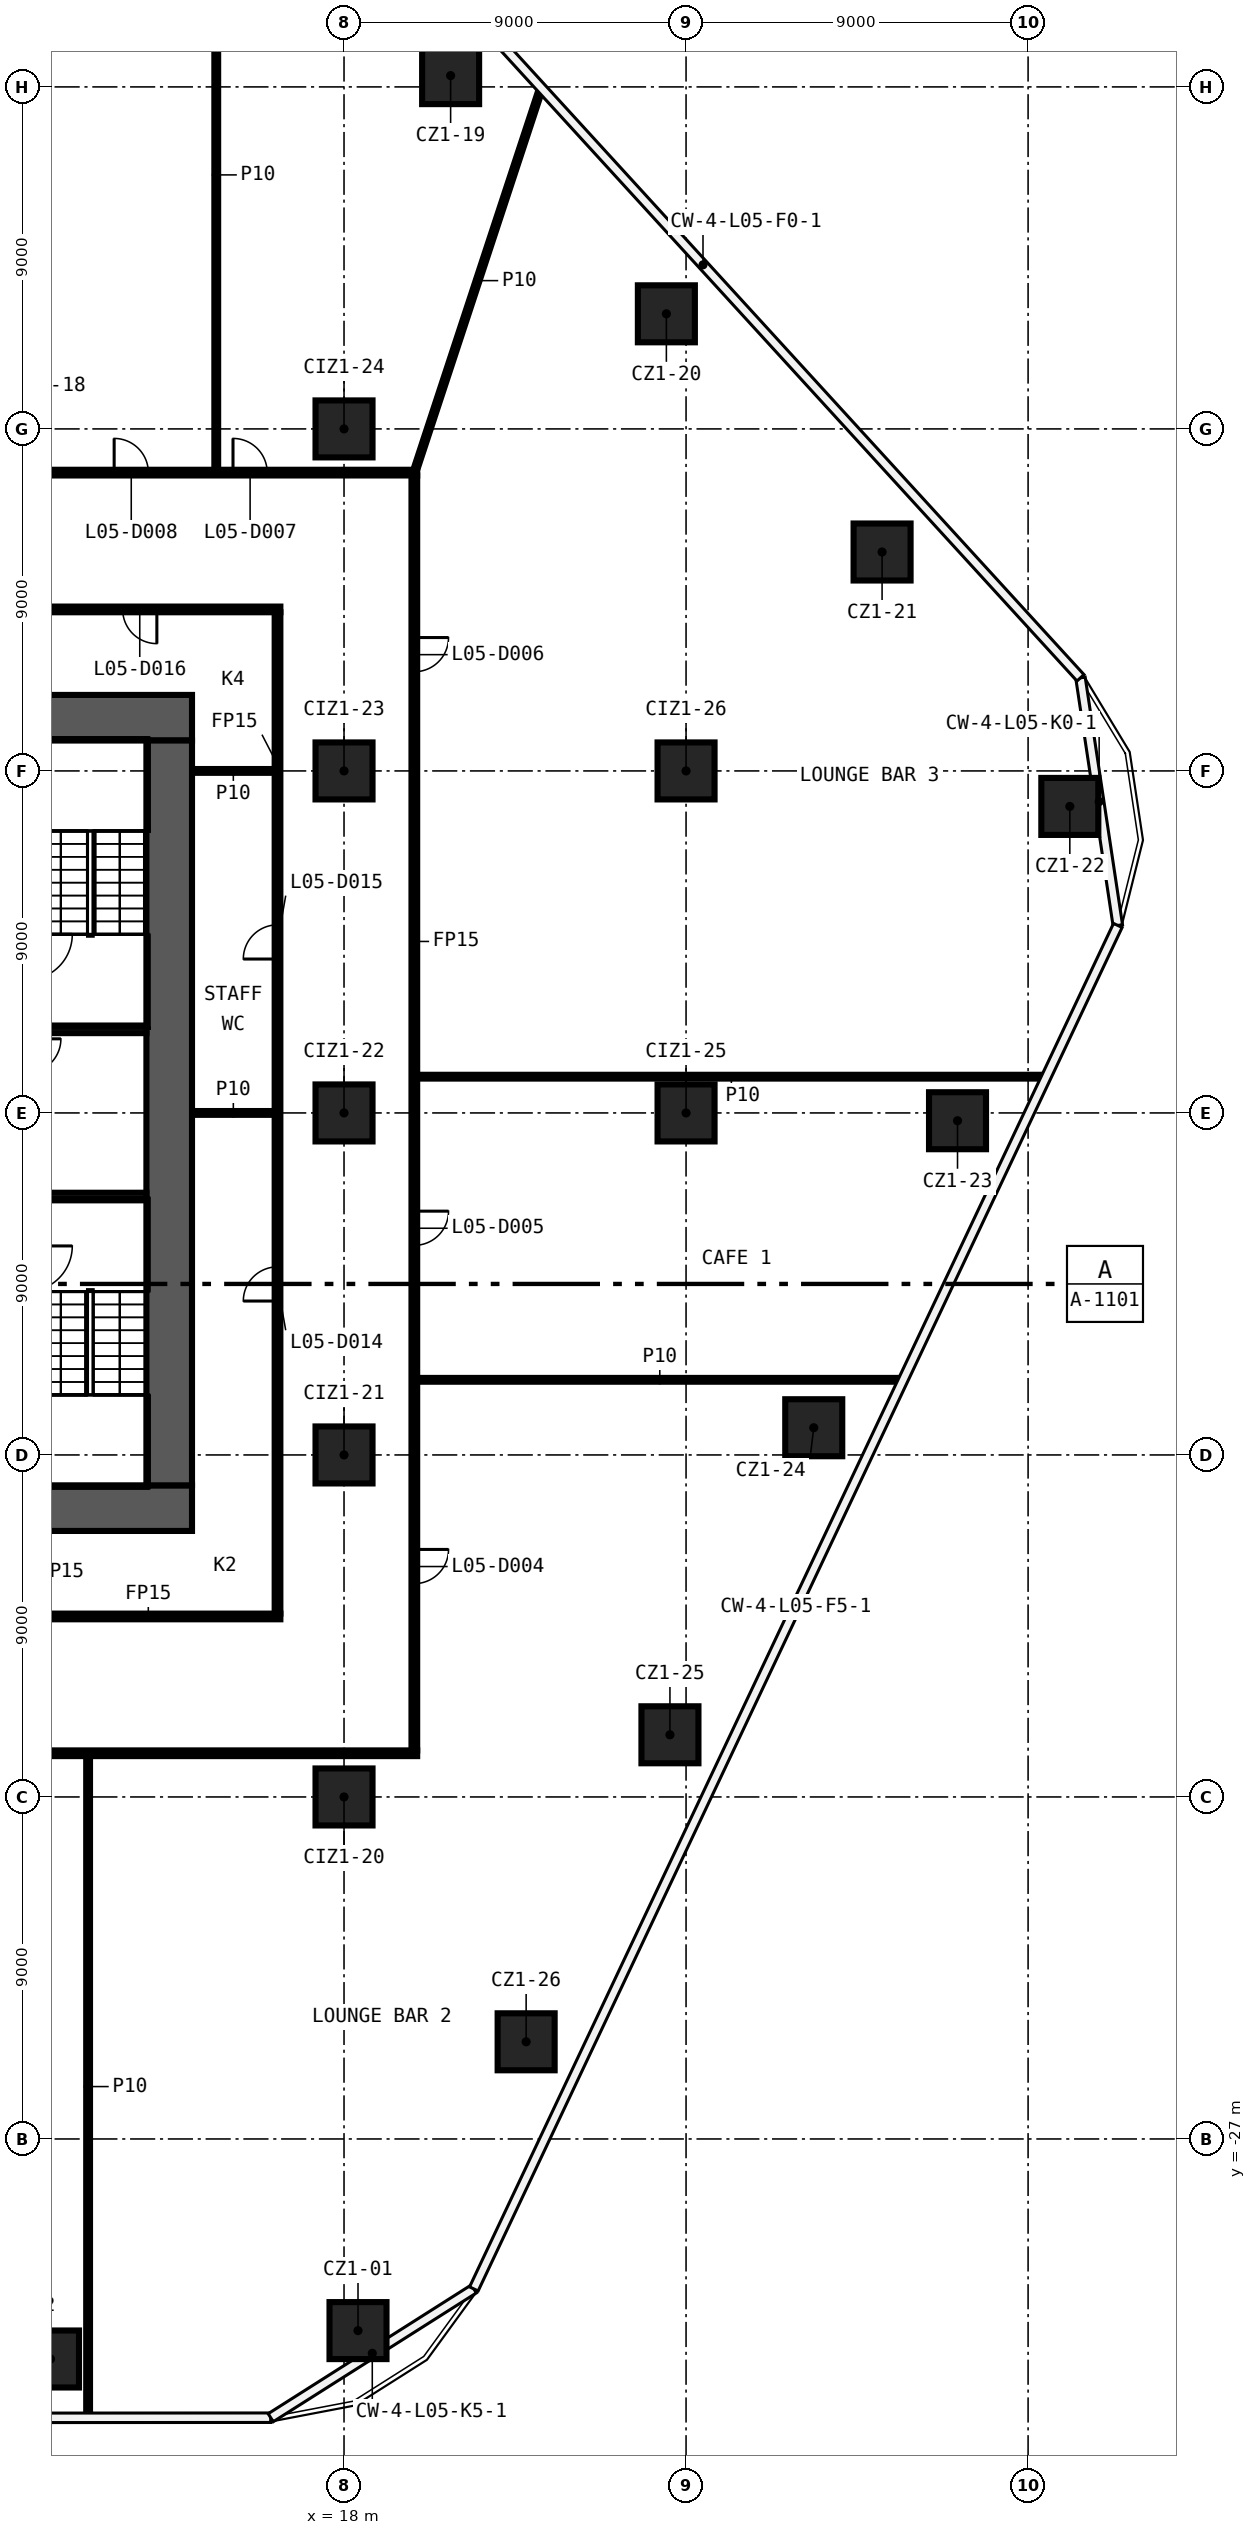
"""IFC4 building model, lengths in metres.
Left out: names, types, materials, properties, quantities, classifications, styles, units other than length and angle.
Written with IfcOpenShell. Run it as: python <this file> out.ifc"""

import sys

from ifc_helpers import new_model, si_unit, direction, frame, frame_2d, origin, origin_2d, place, context, subcontext, project, spatial, rectangle, extrude, element, fill, save


model = new_model("IFC4")
c1 = context("Model", 3, precision=1e-05, world=origin(), true_north=direction((0.0, 1.0)))
c2 = subcontext(c1, "Body", "Model", "MODEL_VIEW")
j1 = project(units=[si_unit("LENGTHUNIT", "METRE"), si_unit("PLANEANGLEUNIT", "RADIAN")], contexts=[c1])
p1 = place(None, origin())
s1 = spatial("IfcSite", under=j1, at=p1, CompositionType="ELEMENT")
p2 = place(p1, origin())
s2 = spatial("IfcBuilding", under=s1, at=p2, CompositionType="ELEMENT")
p3 = place(p2, frame((0.0, 0.0, 38.0)))
s3 = spatial("IfcBuildingStorey", under=s2, at=p3, CompositionType="ELEMENT", Elevation=38.0)
for number, where, z_axis, x_axis in (
    (1, (18.368, -32.043, 0.0), (0.0, 0.0, 1.0), (1.0, 0.0, 0.0)),
    (2, (10.277, -32.79, 0.0), (0.0, 0.0, 1.0), (1.0, 0.0, 0.0)),
    (3, (20.805, 27.297, 0.0), (0.0, 0.0, 1.0), (1.0, 0.0, 0.0)),
    (4, (26.482, 21.029, 0.0), (0.0, 0.0, 1.0), (1.0, 0.0, 0.0)),
    (5, (32.158, 14.761, 0.0), (0.0, 0.0, 1.0), (1.0, 0.0, 0.0)),
    (6, (37.098, 8.066, 0.0), (0.0, 0.0, 1.0), (1.0, 0.0, 0.0)),
    (7, (34.143, -0.205, 0.0), (0.0, 0.0, 1.0), (1.0, 0.0, 0.0)),
    (8, (30.36, -8.284, 0.0), (0.0, 0.0, 1.0), (1.0, 0.0, 0.0)),
    (9, (26.576, -16.364, 0.0), (0.0, 0.0, 1.0), (1.0, 0.0, 0.0)),
    (10, (22.792, -24.443, 0.0), (0.0, 0.0, 1.0), (1.0, 0.0, 0.0)),
    (11, (18.0, -18.0, 0.0), (0.0, 0.0, 1.0), (1.0, 0.0, 0.0)),
    (12, (18.0, -9.0, 0.0), (0.0, 0.0, 1.0), (1.0, 0.0, 0.0)),
    (13, (18.0, 0.0, 0.0), (0.0, 0.0, 1.0), (1.0, 0.0, 0.0)),
    (14, (18.0, 9.0, 0.0), (0.0, 0.0, 1.0), (1.0, 0.0, 0.0)),
    (15, (18.0, 18.0, 0.0), (0.0, 0.0, 1.0), (1.0, 0.0, 0.0)),
    (16, (27.0, 0.0, 0.0), (0.0, 0.0, 1.0), (1.0, 0.0, 0.0)),
    (17, (27.0, 9.0, 0.0), (0.0, 0.0, 1.0), (1.0, 0.0, 0.0)),
):
    element("IfcColumn", number, at=place(p3, frame(where, z_axis=z_axis, x_axis=x_axis)), inside=s3, PredefinedType="COLUMN", context=c2, shape_type="SweptSolid", body=[
        extrude(rectangle(XDim=1.5, YDim=1.5, at=origin_2d()), origin(), (0.0, 0.0, 1.0), 5.6),
    ])
p4 = place(p3, frame((19.925, -16.85, 0.0), z_axis=(0.0, 0.0, 1.0), x_axis=(-1.0, 0.0, 0.0)))
e18 = element("IfcWall", 18, at=p4, inside=s3, PredefinedType="PARTITIONING", context=c2, shape_type="SweptSolid", body=[
    extrude(rectangle(XDim=39.85, YDim=0.15, at=frame_2d((19.925, 0.0))), origin(), (0.0, 0.0, 1.0), 5.6),
])
p5 = place(p4, frame((22.653, 0.0, 0.0)))
e19 = element("IfcOpeningElement", 19, at=p5, cuts=e18, PredefinedType="OPENING", context=c2, shape_type="SweptSolid", body=[
    extrude(rectangle(XDim=0.9, YDim=2.1, at=frame_2d((0.45, 1.05))), frame((0.0, 0.085, 0.0), z_axis=(0.0, -1.0, 0.0), x_axis=(1.0, 0.0, 0.0)), (0.0, 0.0, 1.0), 0.17),
])
p6 = place(p3, frame((9.375, -13.25, 0.0), z_axis=(0.0, 0.0, 1.0), x_axis=(1.0, 0.0, 0.0)))
e20 = element("IfcWall", 20, at=p6, inside=s3, PredefinedType="PARTITIONING", context=c2, shape_type="SweptSolid", body=[
    extrude(rectangle(XDim=6.95, YDim=0.15, at=frame_2d((3.475, 0.0))), origin(), (0.0, 0.0, 1.0), 5.6),
])
p7 = place(p3, frame((19.925, -7.023, 0.0), z_axis=(0.0, 0.0, 1.0), x_axis=(1.0, 0.0, 0.0)))
e21 = element("IfcWall", 21, at=p7, inside=s3, PredefinedType="PARTITIONING", context=c2, shape_type="SweptSolid", body=[
    extrude(rectangle(XDim=12.767, YDim=0.1, at=frame_2d((6.384, 0.0))), origin(), (0.0, 0.0, 1.0), 5.6),
])
p8 = place(p3, frame((14.0, 0.0, 0.0), z_axis=(0.0, 0.0, 1.0), x_axis=(1.0, 0.0, 0.0)))
e22 = element("IfcWall", 22, at=p8, inside=s3, PredefinedType="PARTITIONING", context=c2, shape_type="SweptSolid", body=[
    extrude(rectangle(XDim=2.175, YDim=0.1, at=frame_2d((1.087, 0.0))), origin(), (0.0, 0.0, 1.0), 5.6),
])
p9 = place(p3, frame((19.925, 0.954, 0.0), z_axis=(0.0, 0.0, 1.0), x_axis=(1.0, 0.0, 0.0)))
e23 = element("IfcWall", 23, at=p9, inside=s3, PredefinedType="PARTITIONING", context=c2, shape_type="SweptSolid", body=[
    extrude(rectangle(XDim=16.534, YDim=0.1, at=frame_2d((8.267, 0.0))), origin(), (0.0, 0.0, 1.0), 5.6),
])
p10 = place(p3, frame((14.0, 9.0, 0.0), z_axis=(0.0, 0.0, 1.0), x_axis=(1.0, 0.0, 0.0)))
e24 = element("IfcWall", 24, at=p10, inside=s3, PredefinedType="PARTITIONING", context=c2, shape_type="SweptSolid", body=[
    extrude(rectangle(XDim=2.175, YDim=0.1, at=frame_2d((1.087, 0.0))), origin(), (0.0, 0.0, 1.0), 5.6),
])
p11 = place(p3, frame((16.325, 13.25, 0.0), z_axis=(0.0, 0.0, 1.0), x_axis=(-1.0, 0.0, 0.0)))
e25 = element("IfcWall", 25, at=p11, inside=s3, PredefinedType="PARTITIONING", context=c2, shape_type="SweptSolid", body=[
    extrude(rectangle(XDim=12.35, YDim=0.15, at=frame_2d((6.175, 0.0))), origin(), (0.0, 0.0, 1.0), 5.6),
])
p12 = place(p11, frame((3.25, 0.0, 0.0)))
e26 = element("IfcOpeningElement", 26, at=p12, cuts=e25, PredefinedType="OPENING", context=c2, shape_type="SweptSolid", body=[
    extrude(rectangle(XDim=0.9, YDim=2.1, at=frame_2d((0.45, 1.05))), frame((0.0, 0.085, 0.0), z_axis=(0.0, -1.0, 0.0), x_axis=(1.0, 0.0, 0.0)), (0.0, 0.0, 1.0), 0.17),
])
p13 = place(p3, frame((-19.925, 16.85, 0.0), z_axis=(0.0, 0.0, 1.0), x_axis=(1.0, 0.0, 0.0)))
e27 = element("IfcWall", 27, at=p13, inside=s3, PredefinedType="PARTITIONING", context=c2, shape_type="SweptSolid", body=[
    extrude(rectangle(XDim=39.85, YDim=0.15, at=frame_2d((19.925, 0.0))), origin(), (0.0, 0.0, 1.0), 5.6),
])
p14 = place(p13, frame((35.004, 0.0, 0.0)))
e28 = element("IfcOpeningElement", 28, at=p14, cuts=e27, PredefinedType="OPENING", context=c2, shape_type="SweptSolid", body=[
    extrude(rectangle(XDim=0.9, YDim=2.1, at=frame_2d((0.45, 1.05))), frame((0.0, 0.085, 0.0), z_axis=(0.0, -1.0, 0.0), x_axis=(1.0, 0.0, 0.0)), (0.0, 0.0, 1.0), 0.17),
])
p15 = place(p13, frame((31.876, 0.0, 0.0)))
e29 = element("IfcOpeningElement", 29, at=p15, cuts=e27, PredefinedType="OPENING", context=c2, shape_type="SweptSolid", body=[
    extrude(rectangle(XDim=0.9, YDim=2.1, at=frame_2d((0.45, 1.05))), frame((0.0, 0.085, 0.0), z_axis=(0.0, -1.0, 0.0), x_axis=(1.0, 0.0, 0.0)), (0.0, 0.0, 1.0), 0.17),
])
p16 = place(p13, frame((13.071, 0.0, 0.0)))
e30 = element("IfcOpeningElement", 30, at=p16, cuts=e27, PredefinedType="OPENING", context=c2, shape_type="SweptSolid", body=[
    extrude(rectangle(XDim=0.9, YDim=2.1, at=frame_2d((0.45, 1.05))), frame((0.0, 0.085, 0.0), z_axis=(0.0, -1.0, 0.0), x_axis=(1.0, 0.0, 0.0)), (0.0, 0.0, 1.0), 0.17),
])
p17 = place(p3, frame((19.85, 16.85, 0.0), z_axis=(0.0, 0.0, 1.0), x_axis=(0.313004345266, 0.949751693784, 0.0)))
e31 = element("IfcWall", 31, at=p17, inside=s3, PredefinedType="PARTITIONING", context=c2, shape_type="SweptSolid", body=[
    extrude(rectangle(XDim=10.64, YDim=0.1, at=frame_2d((5.32, 0.0))), origin(), (0.0, 0.0, 1.0), 5.6),
])
p18 = place(p3, frame((19.85, 16.775, 0.0), z_axis=(0.0, 0.0, 1.0), x_axis=(0.0, -1.0, 0.0)))
e32 = element("IfcWall", 32, at=p18, inside=s3, PredefinedType="PARTITIONING", context=c2, shape_type="SweptSolid", body=[
    extrude(rectangle(XDim=33.55, YDim=0.15, at=frame_2d((16.775, 0.0))), origin(), (0.0, 0.0, 1.0), 5.6),
])
p19 = place(p18, frame((28.261, 0.0, 0.0)))
e33 = element("IfcOpeningElement", 33, at=p19, cuts=e32, PredefinedType="OPENING", context=c2, shape_type="SweptSolid", body=[
    extrude(rectangle(XDim=0.9, YDim=2.1, at=frame_2d((0.45, 1.05))), frame((0.0, 0.085, 0.0), z_axis=(0.0, -1.0, 0.0), x_axis=(1.0, 0.0, 0.0)), (0.0, 0.0, 1.0), 0.17),
])
p20 = place(p18, frame((19.36, 0.0, 0.0)))
e34 = element("IfcOpeningElement", 34, at=p20, cuts=e32, PredefinedType="OPENING", context=c2, shape_type="SweptSolid", body=[
    extrude(rectangle(XDim=0.9, YDim=2.1, at=frame_2d((0.45, 1.05))), frame((0.0, 0.085, 0.0), z_axis=(0.0, -1.0, 0.0), x_axis=(1.0, 0.0, 0.0)), (0.0, 0.0, 1.0), 0.17),
])
p21 = place(p18, frame((4.265, 0.0, 0.0)))
e35 = element("IfcOpeningElement", 35, at=p21, cuts=e32, PredefinedType="OPENING", context=c2, shape_type="SweptSolid", body=[
    extrude(rectangle(XDim=0.9, YDim=2.1, at=frame_2d((0.45, 1.05))), frame((0.0, 0.085, 0.0), z_axis=(0.0, -1.0, 0.0), x_axis=(1.0, 0.0, 0.0)), (0.0, 0.0, 1.0), 0.17),
])
p22 = place(p3, frame((16.25, -13.175, 0.0), z_axis=(0.0, 0.0, 1.0), x_axis=(0.0, 1.0, 0.0)))
e36 = element("IfcWall", 36, at=p22, inside=s3, PredefinedType="PARTITIONING", context=c2, shape_type="SweptSolid", body=[
    extrude(rectangle(XDim=26.35, YDim=0.15, at=frame_2d((13.175, 0.0))), origin(), (0.0, 0.0, 1.0), 5.6),
])
p23 = place(p22, frame((8.225, 0.0, 0.0)))
e37 = element("IfcOpeningElement", 37, at=p23, cuts=e36, PredefinedType="OPENING", context=c2, shape_type="SweptSolid", body=[
    extrude(rectangle(XDim=0.9, YDim=2.1, at=frame_2d((0.45, 1.05))), frame((0.0, 0.085, 0.0), z_axis=(0.0, -1.0, 0.0), x_axis=(1.0, 0.0, 0.0)), (0.0, 0.0, 1.0), 0.17),
])
p24 = place(p22, frame((17.225, 0.0, 0.0)))
e38 = element("IfcOpeningElement", 38, at=p24, cuts=e36, PredefinedType="OPENING", context=c2, shape_type="SweptSolid", body=[
    extrude(rectangle(XDim=0.9, YDim=2.1, at=frame_2d((0.45, 1.05))), frame((0.0, 0.085, 0.0), z_axis=(0.0, -1.0, 0.0), x_axis=(1.0, 0.0, 0.0)), (0.0, 0.0, 1.0), 0.17),
])
p25 = place(p3, frame((14.638, 16.925, 0.0), z_axis=(0.0, 0.0, 1.0), x_axis=(0.0, 1.0, 0.0)))
e39 = element("IfcWall", 39, at=p25, inside=s3, PredefinedType="PARTITIONING", context=c2, shape_type="SweptSolid", body=[
    extrude(rectangle(XDim=15.519, YDim=0.1, at=frame_2d((7.76, 0.0))), origin(), (0.0, 0.0, 1.0), 5.6),
])
p26 = place(p3, frame((11.266, -34.318, 0.0), z_axis=(0.0, 0.0, 1.0), x_axis=(0.0, 1.0, 0.0)))
e40 = element("IfcWall", 40, at=p26, inside=s3, PredefinedType="PARTITIONING", context=c2, shape_type="SweptSolid", body=[
    extrude(rectangle(XDim=17.393, YDim=0.1, at=frame_2d((8.696, 0.0))), origin(), (0.0, 0.0, 1.0), 5.6),
])
p27 = place(p3, frame((-14.0, 10.4, 0.0), z_axis=(0.0, 0.0, 1.0), x_axis=(1.0, 0.0, 0.0)))
e41 = element("IfcWall", 41, at=p27, inside=s3, PredefinedType="SHEAR", context=c2, shape_type="SweptSolid", body=[
    extrude(rectangle(XDim=28.0, YDim=1.2, at=frame_2d((14.0, 0.0))), origin(), (0.0, 0.0, 1.0), 5.6),
])
p28 = place(p27, frame((15.9, 0.0, 0.0)))
e42 = element("IfcOpeningElement", 42, at=p28, cuts=e41, PredefinedType="OPENING", context=c2, shape_type="SweptSolid", body=[
    extrude(rectangle(XDim=1.6, YDim=2.1, at=frame_2d((0.8, 1.05))), frame((0.0, 0.61, 0.0), z_axis=(0.0, -1.0, 0.0), x_axis=(1.0, 0.0, 0.0)), (0.0, 0.0, 1.0), 1.22),
])
p29 = place(p3, frame((14.0, -10.4, 0.0), z_axis=(0.0, 0.0, 1.0), x_axis=(-1.0, 0.0, 0.0)))
e43 = element("IfcWall", 43, at=p29, inside=s3, PredefinedType="SHEAR", context=c2, shape_type="SweptSolid", body=[
    extrude(rectangle(XDim=28.0, YDim=1.2, at=frame_2d((14.0, 0.0))), origin(), (0.0, 0.0, 1.0), 5.6),
])
p30 = place(p29, frame((5.1, 0.0, 0.0)))
e44 = element("IfcOpeningElement", 44, at=p30, cuts=e43, PredefinedType="OPENING", context=c2, shape_type="SweptSolid", body=[
    extrude(rectangle(XDim=1.6, YDim=2.1, at=frame_2d((0.8, 1.05))), frame((0.0, 0.61, 0.0), z_axis=(0.0, -1.0, 0.0), x_axis=(1.0, 0.0, 0.0)), (0.0, 0.0, 1.0), 1.22),
])
p31 = place(p3, frame((13.4, 9.8, 0.0), z_axis=(0.0, 0.0, 1.0), x_axis=(0.0, -1.0, 0.0)))
e45 = element("IfcWall", 45, at=p31, inside=s3, PredefinedType="SHEAR", context=c2, shape_type="SweptSolid", body=[
    extrude(rectangle(XDim=19.6, YDim=1.2, at=frame_2d((9.8, 0.0))), origin(), (0.0, 0.0, 1.0), 5.6),
])
for number, where, z_axis, x_axis in (
    (46, (9.45, 2.2, 0.0), (0.0, 0.0, 1.0), (1.0, 0.0, 0.0)),
    (47, (9.45, -2.2, 0.0), (0.0, 0.0, 1.0), (1.0, 0.0, 0.0)),
):
    element("IfcWall", number, at=place(p3, frame(where, z_axis=z_axis, x_axis=x_axis)), inside=s3, PredefinedType="SHEAR", context=c2, shape_type="SweptSolid", body=[
        extrude(rectangle(XDim=3.35, YDim=0.2, at=frame_2d((1.675, 0.0))), origin(), (0.0, 0.0, 1.0), 5.6),
    ])
p32 = place(p19, origin())
e48 = element("IfcDoor", 48, at=p32, inside=s3, OperationType="SINGLE_SWING_LEFT", PredefinedType="DOOR", context=c2, shape_type="SweptSolid", body=[
    extrude(rectangle(XDim=0.9, YDim=2.1, at=frame_2d((0.45, 1.05))), frame((0.0, 0.025, 0.0), z_axis=(0.0, -1.0, 0.0), x_axis=(1.0, 0.0, 0.0)), (0.0, 0.0, 1.0), 0.05),
])
fill(e33, e48)
p33 = place(p20, origin())
e49 = element("IfcDoor", 49, at=p33, inside=s3, OperationType="SINGLE_SWING_RIGHT", PredefinedType="DOOR", context=c2, shape_type="SweptSolid", body=[
    extrude(rectangle(XDim=0.9, YDim=2.1, at=frame_2d((0.45, 1.05))), frame((0.0, 0.025, 0.0), z_axis=(0.0, -1.0, 0.0), x_axis=(1.0, 0.0, 0.0)), (0.0, 0.0, 1.0), 0.05),
])
fill(e34, e49)
p34 = place(p21, origin())
e50 = element("IfcDoor", 50, at=p34, inside=s3, OperationType="SINGLE_SWING_LEFT", PredefinedType="DOOR", context=c2, shape_type="SweptSolid", body=[
    extrude(rectangle(XDim=0.9, YDim=2.1, at=frame_2d((0.45, 1.05))), frame((0.0, 0.025, 0.0), z_axis=(0.0, -1.0, 0.0), x_axis=(1.0, 0.0, 0.0)), (0.0, 0.0, 1.0), 0.05),
])
fill(e35, e50)
p35 = place(p14, origin())
e51 = element("IfcDoor", 51, at=p35, inside=s3, OperationType="SINGLE_SWING_RIGHT", PredefinedType="DOOR", context=c2, shape_type="SweptSolid", body=[
    extrude(rectangle(XDim=0.9, YDim=2.1, at=frame_2d((0.45, 1.05))), frame((0.0, 0.025, 0.0), z_axis=(0.0, -1.0, 0.0), x_axis=(1.0, 0.0, 0.0)), (0.0, 0.0, 1.0), 0.05),
])
fill(e28, e51)
p36 = place(p15, origin())
e52 = element("IfcDoor", 52, at=p36, inside=s3, OperationType="SINGLE_SWING_LEFT", PredefinedType="DOOR", context=c2, shape_type="SweptSolid", body=[
    extrude(rectangle(XDim=0.9, YDim=2.1, at=frame_2d((0.45, 1.05))), frame((0.0, 0.025, 0.0), z_axis=(0.0, -1.0, 0.0), x_axis=(1.0, 0.0, 0.0)), (0.0, 0.0, 1.0), 0.05),
])
fill(e29, e52)
p37 = place(p23, origin())
e53 = element("IfcDoor", 53, at=p37, inside=s3, OperationType="SINGLE_SWING_LEFT", PredefinedType="DOOR", context=c2, shape_type="SweptSolid", body=[
    extrude(rectangle(XDim=0.9, YDim=2.1, at=frame_2d((0.45, 1.05))), frame((0.0, 0.025, 0.0), z_axis=(0.0, -1.0, 0.0), x_axis=(1.0, 0.0, 0.0)), (0.0, 0.0, 1.0), 0.05),
])
fill(e37, e53)
p38 = place(p24, origin())
e54 = element("IfcDoor", 54, at=p38, inside=s3, OperationType="SINGLE_SWING_RIGHT", PredefinedType="DOOR", context=c2, shape_type="SweptSolid", body=[
    extrude(rectangle(XDim=0.9, YDim=2.1, at=frame_2d((0.45, 1.05))), frame((0.0, 0.025, 0.0), z_axis=(0.0, -1.0, 0.0), x_axis=(1.0, 0.0, 0.0)), (0.0, 0.0, 1.0), 0.05),
])
fill(e38, e54)
p39 = place(p12, origin())
e55 = element("IfcDoor", 55, at=p39, inside=s3, OperationType="SINGLE_SWING_LEFT", PredefinedType="DOOR", context=c2, shape_type="SweptSolid", body=[
    extrude(rectangle(XDim=0.9, YDim=2.1, at=frame_2d((0.45, 1.05))), frame((0.0, 0.025, 0.0), z_axis=(0.0, -1.0, 0.0), x_axis=(1.0, 0.0, 0.0)), (0.0, 0.0, 1.0), 0.05),
])
fill(e26, e55)
save(model, sys.argv[1])
